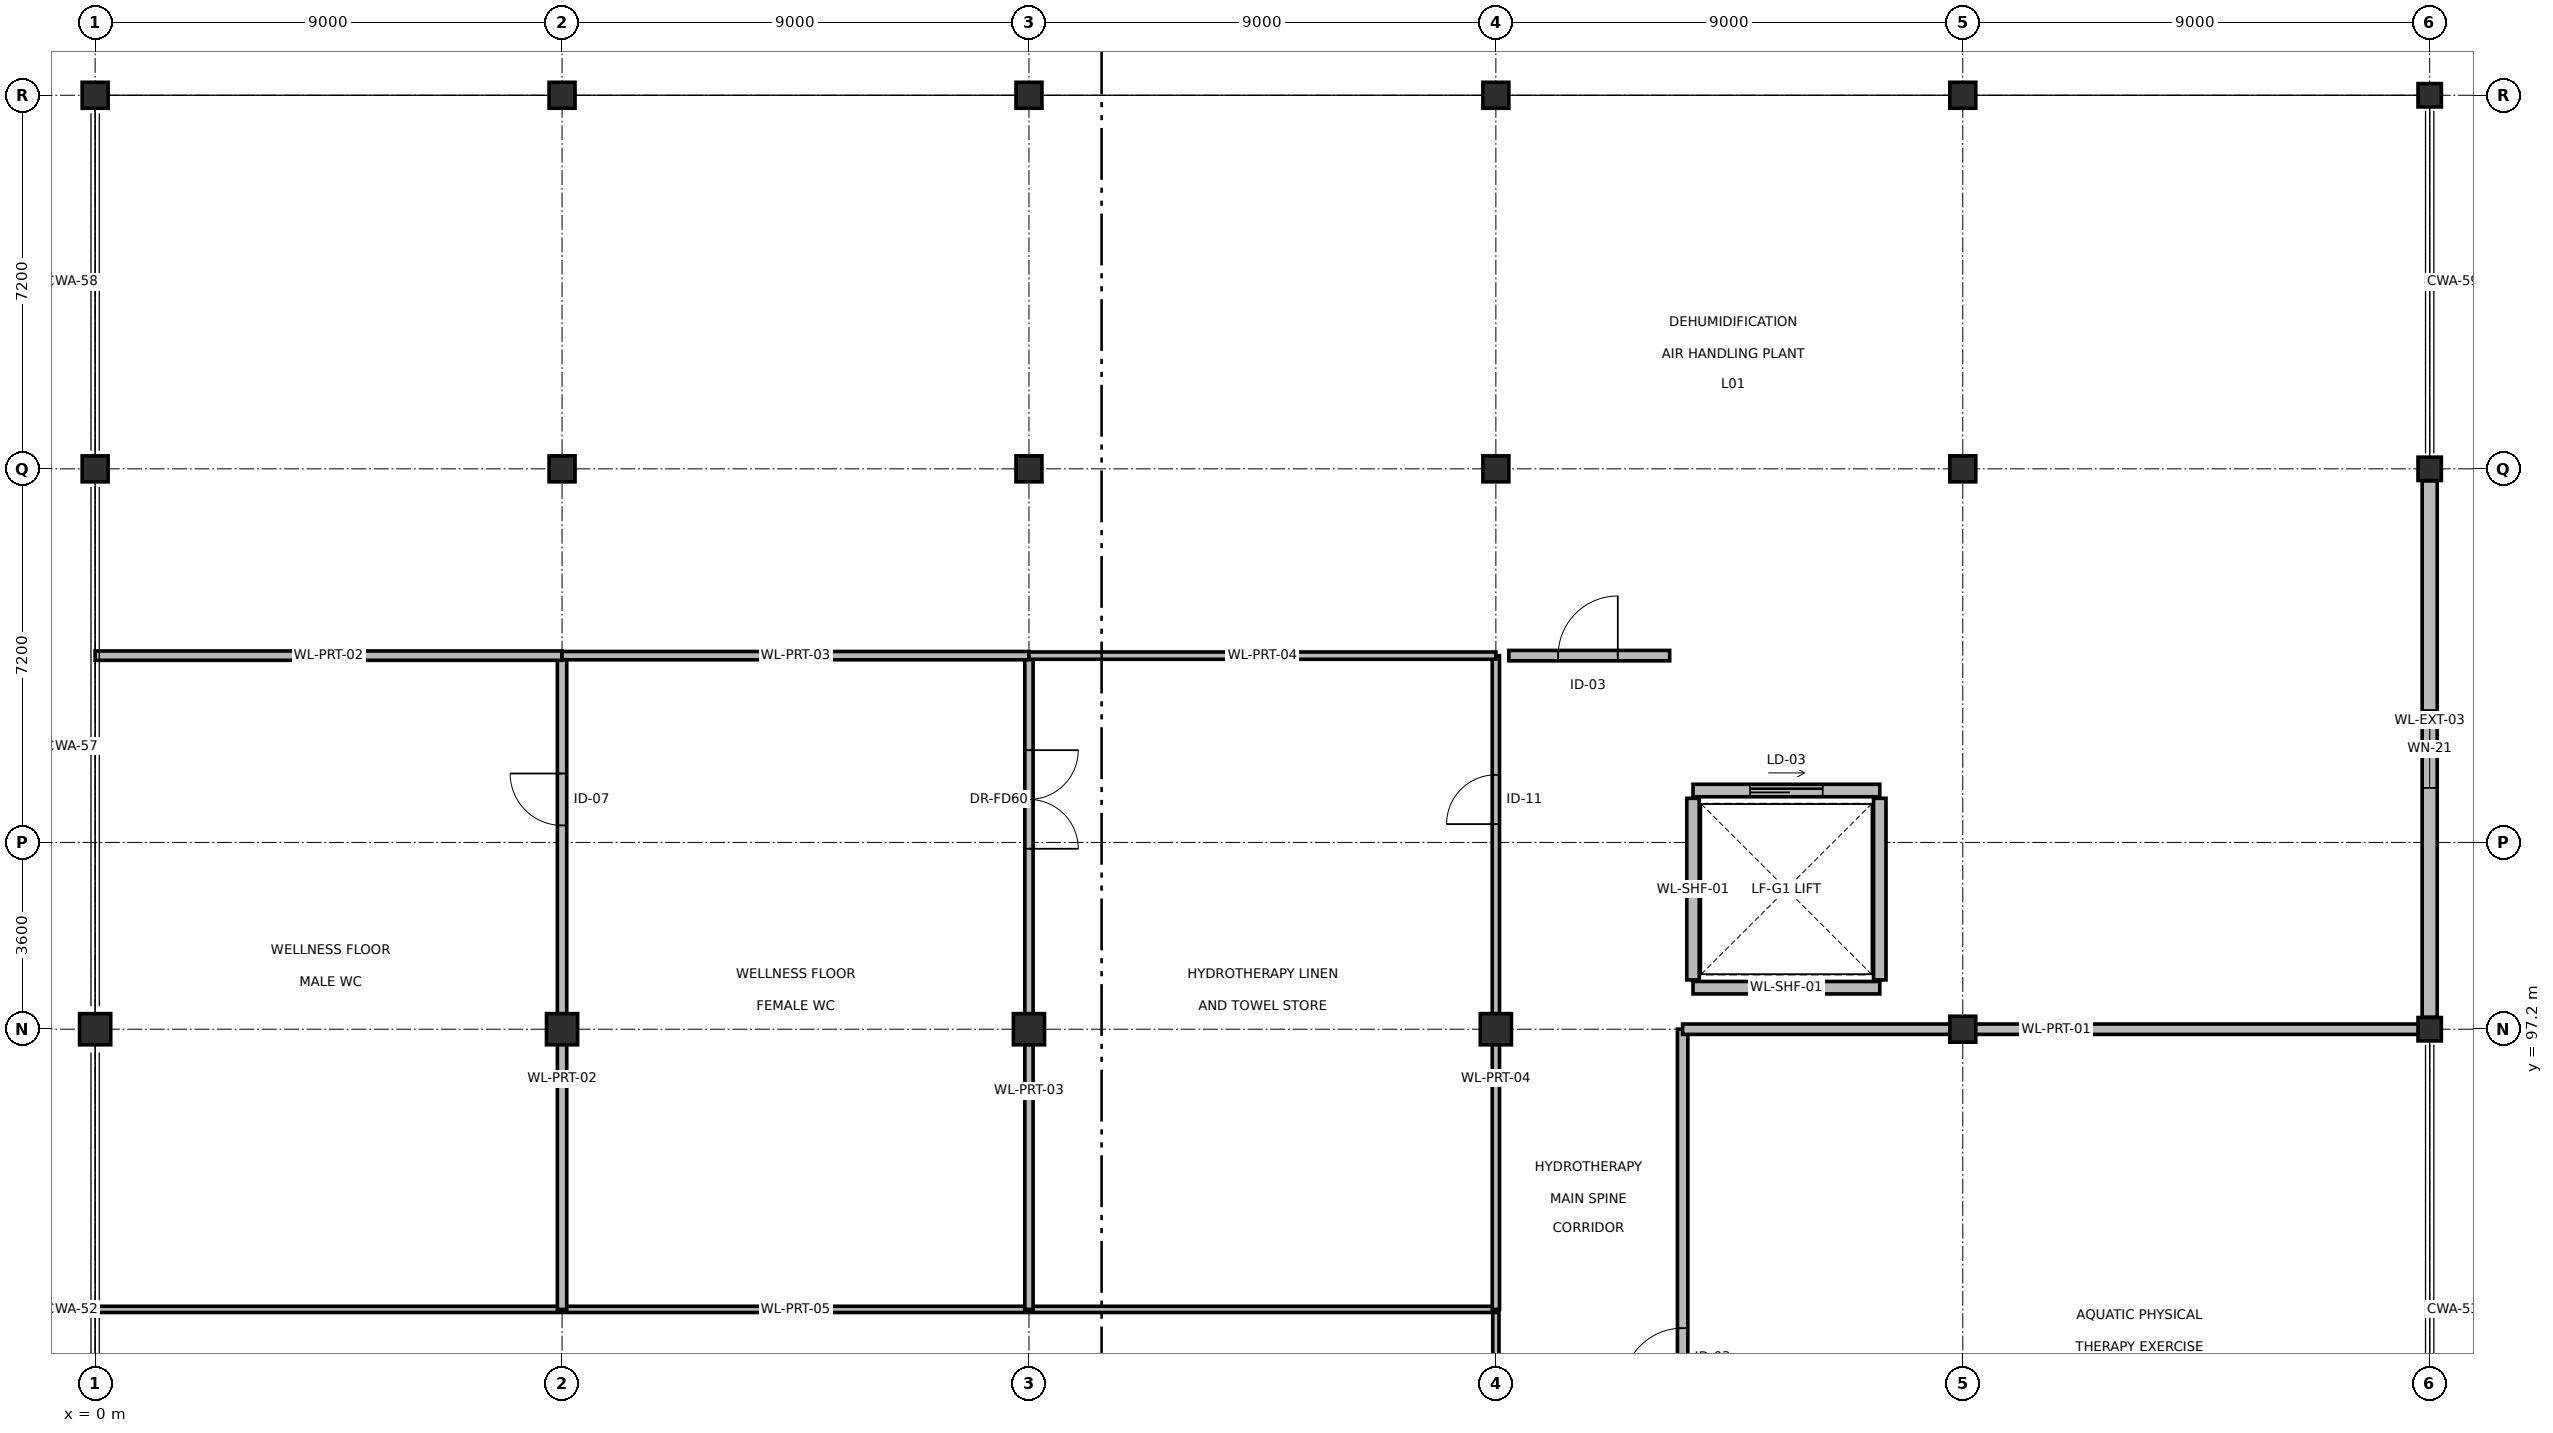
"""IFC4 building model, lengths in metres.
Left out: names, types, materials, properties, quantities, classifications, styles, units other than length and angle.
Written with IfcOpenShell. Run it as: python <this file> out.ifc"""

import sys

from ifc_helpers import new_model, si_unit, direction, frame, frame_2d, origin, origin_2d, place, context, subcontext, project, spatial, rectangle, extrude, element, fill, save


model = new_model("IFC4")
c1 = context("Model", 3, precision=1e-05, world=origin(), true_north=direction((0.0, 1.0)))
c2 = subcontext(c1, "Body", "Model", "MODEL_VIEW")
j1 = project(units=[si_unit("LENGTHUNIT", "METRE"), si_unit("PLANEANGLEUNIT", "RADIAN")], contexts=[c1])
p1 = place(None, origin())
s1 = spatial("IfcSite", under=j1, at=p1, CompositionType="ELEMENT")
p2 = place(p1, origin())
s2 = spatial("IfcBuilding", under=s1, at=p2, CompositionType="ELEMENT")
p3 = place(p2, frame((0.0, 0.0, 4.8)))
s3 = spatial("IfcBuildingStorey", under=s2, at=p3, CompositionType="ELEMENT", Elevation=4.8)
for number, where, z_axis, x_axis in (
    (1, (0.0, 97.2, 0.0), (0.0, 0.0, 1.0), (1.0, 0.0, 0.0)),
    (2, (9.0, 97.2, 0.0), (0.0, 0.0, 1.0), (1.0, 0.0, 0.0)),
    (3, (18.0, 97.2, 0.0), (0.0, 0.0, 1.0), (1.0, 0.0, 0.0)),
    (4, (27.0, 97.2, 0.0), (0.0, 0.0, 1.0), (1.0, 0.0, 0.0)),
):
    element("IfcColumn", number, at=place(p3, frame(where, z_axis=z_axis, x_axis=x_axis)), inside=s3, PredefinedType="COLUMN", context=c2, shape_type="SweptSolid", body=[
        extrude(rectangle(XDim=0.6, YDim=0.6, at=origin_2d()), origin(), (0.0, 0.0, 1.0), 4.8),
    ])
for number, where, z_axis, x_axis in (
    (5, (0.0, 108.0, 0.0), (0.0, 0.0, 1.0), (1.0, 0.0, 0.0)),
    (6, (0.0, 115.2, 0.0), (0.0, 0.0, 1.0), (1.0, 0.0, 0.0)),
    (7, (9.0, 108.0, 0.0), (0.0, 0.0, 1.0), (1.0, 0.0, 0.0)),
    (8, (9.0, 115.2, 0.0), (0.0, 0.0, 1.0), (1.0, 0.0, 0.0)),
    (9, (18.0, 108.0, 0.0), (0.0, 0.0, 1.0), (1.0, 0.0, 0.0)),
    (10, (18.0, 115.2, 0.0), (0.0, 0.0, 1.0), (1.0, 0.0, 0.0)),
    (11, (27.0, 108.0, 0.0), (0.0, 0.0, 1.0), (1.0, 0.0, 0.0)),
    (12, (27.0, 115.2, 0.0), (0.0, 0.0, 1.0), (1.0, 0.0, 0.0)),
    (13, (36.0, 97.2, 0.0), (0.0, 0.0, 1.0), (1.0, 0.0, 0.0)),
    (14, (36.0, 108.0, 0.0), (0.0, 0.0, 1.0), (1.0, 0.0, 0.0)),
    (15, (36.0, 115.2, 0.0), (0.0, 0.0, 1.0), (1.0, 0.0, 0.0)),
):
    element("IfcColumn", number, at=place(p3, frame(where, z_axis=z_axis, x_axis=x_axis)), inside=s3, PredefinedType="COLUMN", context=c2, shape_type="SweptSolid", body=[
        extrude(rectangle(XDim=0.5, YDim=0.5, at=origin_2d()), origin(), (0.0, 0.0, 1.0), 4.8),
    ])
for number, where, z_axis, x_axis in (
    (16, (45.0, 97.2, 0.0), (0.0, 0.0, 1.0), (1.0, 0.0, 0.0)),
    (17, (45.0, 108.0, 0.0), (0.0, 0.0, 1.0), (1.0, 0.0, 0.0)),
    (18, (45.0, 115.2, 0.0), (0.0, 0.0, 1.0), (1.0, 0.0, 0.0)),
):
    element("IfcColumn", number, at=place(p3, frame(where, z_axis=z_axis, x_axis=x_axis)), inside=s3, PredefinedType="COLUMN", context=c2, shape_type="SweptSolid", body=[
        extrude(rectangle(XDim=0.45, YDim=0.45, at=origin_2d()), origin(), (0.0, 0.0, 1.0), 4.8),
    ])
p4 = place(p3, frame((45.0, 107.77, 0.0), z_axis=(0.0, 0.0, 1.0), x_axis=(0.0, -1.0, 0.0)))
e19 = element("IfcWall", 19, at=p4, inside=s3, PredefinedType="SOLIDWALL", context=c2, shape_type="SweptSolid", body=[
    extrude(rectangle(XDim=10.34, YDim=0.29, at=frame_2d((5.17, 0.0))), origin(), (0.0, 0.0, 1.0), 3.825),
])
p5 = place(p4, frame((4.42, 0.0, 0.85)))
e20 = element("IfcOpeningElement", 20, at=p5, cuts=e19, PredefinedType="OPENING", context=c2, shape_type="SweptSolid", body=[
    extrude(rectangle(XDim=1.5, YDim=1.8, at=frame_2d((0.75, 0.9))), frame((0.0, 0.155, 0.0), z_axis=(0.0, -1.0, 0.0), x_axis=(1.0, 0.0, 0.0)), (0.0, 0.0, 1.0), 0.31),
])
p6 = place(p3, frame((30.8, 101.8, 0.0), z_axis=(0.0, 0.0, 1.0), x_axis=(1.0, 0.0, 0.0)))
e21 = element("IfcWall", 21, at=p6, inside=s3, PredefinedType="SOLIDWALL", context=c2, shape_type="SweptSolid", body=[
    extrude(rectangle(XDim=3.6, YDim=0.24, at=frame_2d((1.8, 0.0))), origin(), (0.0, 0.0, 1.0), 4.485),
])
p7 = place(p6, frame((1.1, 0.0, 0.0)))
e22 = element("IfcOpeningElement", 22, at=p7, cuts=e21, PredefinedType="OPENING", context=c2, shape_type="SweptSolid", body=[
    extrude(rectangle(XDim=1.4, YDim=2.3, at=frame_2d((0.7, 1.15))), frame((0.0, 0.13, 0.0), z_axis=(0.0, -1.0, 0.0), x_axis=(1.0, 0.0, 0.0)), (0.0, 0.0, 1.0), 0.26),
])
p8 = place(p3, frame((30.8, 98.0, 0.0), z_axis=(0.0, 0.0, 1.0), x_axis=(1.0, 0.0, 0.0)))
e23 = element("IfcWall", 23, at=p8, inside=s3, PredefinedType="SOLIDWALL", context=c2, shape_type="SweptSolid", body=[
    extrude(rectangle(XDim=3.6, YDim=0.24, at=frame_2d((1.8, 0.0))), origin(), (0.0, 0.0, 1.0), 4.485),
])
for number, where, z_axis, x_axis in (
    (24, (30.8, 98.15, 0.0), (0.0, 0.0, 1.0), (0.0, 1.0, 0.0)),
    (25, (34.4, 98.15, 0.0), (0.0, 0.0, 1.0), (0.0, 1.0, 0.0)),
):
    element("IfcWall", number, at=place(p3, frame(where, z_axis=z_axis, x_axis=x_axis)), inside=s3, PredefinedType="SOLIDWALL", context=c2, shape_type="SweptSolid", body=[
        extrude(rectangle(XDim=3.5, YDim=0.24, at=frame_2d((1.75, 0.0))), origin(), (0.0, 0.0, 1.0), 4.485),
    ])
p9 = place(p3, frame((27.25, 104.4, 0.0), z_axis=(0.0, 0.0, 1.0), x_axis=(1.0, 0.0, 0.0)))
e26 = element("IfcWall", 26, at=p9, inside=s3, PredefinedType="PARTITIONING", context=c2, shape_type="SweptSolid", body=[
    extrude(rectangle(XDim=3.1, YDim=0.2, at=frame_2d((1.55, 0.0))), origin(), (0.0, 0.0, 1.0), 3.775),
])
p10 = place(p9, frame((0.95, 0.0, 0.0)))
e27 = element("IfcOpeningElement", 27, at=p10, cuts=e26, PredefinedType="OPENING", context=c2, shape_type="SweptSolid", body=[
    extrude(rectangle(XDim=1.15, YDim=2.2, at=frame_2d((0.575, 1.1))), frame((0.0, 0.11, 0.0), z_axis=(0.0, -1.0, 0.0), x_axis=(1.0, 0.0, 0.0)), (0.0, 0.0, 1.0), 0.22),
])
p11 = place(p3, frame((27.0, 68.4, 0.0), z_axis=(0.0, 0.0, 1.0), x_axis=(0.0, 1.0, 0.0)))
e28 = element("IfcWall", 28, at=p11, inside=s3, PredefinedType="PARTITIONING", context=c2, shape_type="SweptSolid", body=[
    extrude(rectangle(XDim=23.4, YDim=0.12, at=frame_2d((11.7, 0.0))), origin(), (0.0, 0.0, 1.0), 3.775),
])
p12 = place(p11, frame((4.698, 0.0, 0.0)))
e29 = element("IfcOpeningElement", 29, at=p12, cuts=e28, PredefinedType="OPENING", context=c2, shape_type="SweptSolid", body=[
    extrude(rectangle(XDim=0.9, YDim=2.1, at=frame_2d((0.45, 1.05))), frame((0.0, 0.07, 0.0), z_axis=(0.0, -1.0, 0.0), x_axis=(1.0, 0.0, 0.0)), (0.0, 0.0, 1.0), 0.14),
])
p13 = place(p3, frame((0.0, 91.8, 0.0), z_axis=(0.0, 0.0, 1.0), x_axis=(1.0, 0.0, 0.0)))
e30 = element("IfcWall", 30, at=p13, inside=s3, PredefinedType="PARTITIONING", context=c2, shape_type="SweptSolid", body=[
    extrude(rectangle(XDim=27.0, YDim=0.12, at=frame_2d((13.5, 0.0))), origin(), (0.0, 0.0, 1.0), 3.775),
])
p14 = place(p3, frame((30.6, 68.4, 0.0), z_axis=(0.0, 0.0, 1.0), x_axis=(0.0, 1.0, 0.0)))
e31 = element("IfcWall", 31, at=p14, inside=s3, PredefinedType="PARTITIONING", context=c2, shape_type="SweptSolid", body=[
    extrude(rectangle(XDim=28.8, YDim=0.2, at=frame_2d((14.4, 0.0))), origin(), (0.0, 0.0, 1.0), 3.875),
])
p15 = place(p14, frame((21.889, 0.0, 0.0)))
e32 = element("IfcOpeningElement", 32, at=p15, cuts=e31, PredefinedType="OPENING", context=c2, shape_type="SweptSolid", body=[
    extrude(rectangle(XDim=1.15, YDim=2.2, at=frame_2d((0.575, 1.1))), frame((0.0, 0.11, 0.0), z_axis=(0.0, -1.0, 0.0), x_axis=(1.0, 0.0, 0.0)), (0.0, 0.0, 1.0), 0.22),
])
p16 = place(p3, frame((30.6, 97.2, 0.0), z_axis=(0.0, 0.0, 1.0), x_axis=(1.0, 0.0, 0.0)))
e33 = element("IfcWall", 33, at=p16, inside=s3, PredefinedType="PARTITIONING", context=c2, shape_type="SweptSolid", body=[
    extrude(rectangle(XDim=14.4, YDim=0.2, at=frame_2d((7.2, 0.0))), origin(), (0.0, 0.0, 1.0), 3.775),
])
p17 = place(p3, frame((9.0, 91.8, 0.0), z_axis=(0.0, 0.0, 1.0), x_axis=(0.0, 1.0, 0.0)))
e34 = element("IfcWall", 34, at=p17, inside=s3, PredefinedType="PARTITIONING", context=c2, shape_type="SweptSolid", body=[
    extrude(rectangle(XDim=12.6, YDim=0.18, at=frame_2d((6.3, 0.0))), origin(), (0.0, 0.0, 1.0), 3.775),
])
p18 = place(p17, frame((9.328, 0.0, 0.0)))
e35 = element("IfcOpeningElement", 35, at=p18, cuts=e34, PredefinedType="OPENING", context=c2, shape_type="SweptSolid", body=[
    extrude(rectangle(XDim=1.0, YDim=2.1, at=frame_2d((0.5, 1.05))), frame((0.0, 0.1, 0.0), z_axis=(0.0, -1.0, 0.0), x_axis=(1.0, 0.0, 0.0)), (0.0, 0.0, 1.0), 0.2),
])
p19 = place(p3, frame((0.0, 104.4, 0.0), z_axis=(0.0, 0.0, 1.0), x_axis=(1.0, 0.0, 0.0)))
e36 = element("IfcWall", 36, at=p19, inside=s3, PredefinedType="PARTITIONING", context=c2, shape_type="SweptSolid", body=[
    extrude(rectangle(XDim=9.0, YDim=0.18, at=frame_2d((4.5, 0.0))), origin(), (0.0, 0.0, 1.0), 3.775),
])
p20 = place(p3, frame((18.0, 91.8, 0.0), z_axis=(0.0, 0.0, 1.0), x_axis=(0.0, 1.0, 0.0)))
e37 = element("IfcWall", 37, at=p20, inside=s3, PredefinedType="PARTITIONING", context=c2, shape_type="SweptSolid", body=[
    extrude(rectangle(XDim=12.6, YDim=0.16, at=frame_2d((6.3, 0.0))), origin(), (0.0, 0.0, 1.0), 3.775),
])
p21 = place(p20, frame((8.878, 0.0, 0.0)))
e38 = element("IfcOpeningElement", 38, at=p21, cuts=e37, PredefinedType="OPENING", context=c2, shape_type="SweptSolid", body=[
    extrude(rectangle(XDim=1.9, YDim=2.2, at=frame_2d((0.95, 1.1))), frame((0.0, 0.09, 0.0), z_axis=(0.0, -1.0, 0.0), x_axis=(1.0, 0.0, 0.0)), (0.0, 0.0, 1.0), 0.18),
])
p22 = place(p3, frame((9.0, 104.4, 0.0), z_axis=(0.0, 0.0, 1.0), x_axis=(1.0, 0.0, 0.0)))
e39 = element("IfcWall", 39, at=p22, inside=s3, PredefinedType="PARTITIONING", context=c2, shape_type="SweptSolid", body=[
    extrude(rectangle(XDim=9.0, YDim=0.16, at=frame_2d((4.5, 0.0))), origin(), (0.0, 0.0, 1.0), 3.775),
])
p23 = place(p3, frame((27.0, 91.8, 0.0), z_axis=(0.0, 0.0, 1.0), x_axis=(0.0, 1.0, 0.0)))
e40 = element("IfcWall", 40, at=p23, inside=s3, PredefinedType="PARTITIONING", context=c2, shape_type="SweptSolid", body=[
    extrude(rectangle(XDim=12.6, YDim=0.14, at=frame_2d((6.3, 0.0))), origin(), (0.0, 0.0, 1.0), 3.775),
])
p24 = place(p23, frame((9.353, 0.0, 0.0)))
e41 = element("IfcOpeningElement", 41, at=p24, cuts=e40, PredefinedType="OPENING", context=c2, shape_type="SweptSolid", body=[
    extrude(rectangle(XDim=0.95, YDim=2.1, at=frame_2d((0.475, 1.05))), frame((0.0, 0.08, 0.0), z_axis=(0.0, -1.0, 0.0), x_axis=(1.0, 0.0, 0.0)), (0.0, 0.0, 1.0), 0.16),
])
p25 = place(p3, frame((18.0, 104.4, 0.0), z_axis=(0.0, 0.0, 1.0), x_axis=(1.0, 0.0, 0.0)))
e42 = element("IfcWall", 42, at=p25, inside=s3, PredefinedType="PARTITIONING", context=c2, shape_type="SweptSolid", body=[
    extrude(rectangle(XDim=9.0, YDim=0.14, at=frame_2d((4.5, 0.0))), origin(), (0.0, 0.0, 1.0), 3.775),
])
p26 = place(p5, origin())
e43 = element("IfcWindow", 43, at=p26, inside=s3, PartitioningType="SINGLE_PANEL", PredefinedType="WINDOW", context=c2, shape_type="SweptSolid", body=[
    extrude(rectangle(XDim=1.5, YDim=1.8, at=frame_2d((0.75, 0.9))), frame((0.0, 0.03, 0.0), z_axis=(0.0, -1.0, 0.0), x_axis=(1.0, 0.0, 0.0)), (0.0, 0.0, 1.0), 0.06),
])
fill(e20, e43)
p27 = place(p7, origin())
e44 = element("IfcDoor", 44, at=p27, inside=s3, OperationType="DOUBLE_DOOR_SLIDING", PredefinedType="DOOR", context=c2, shape_type="SweptSolid", body=[
    extrude(rectangle(XDim=1.4, YDim=2.3, at=frame_2d((0.7, 1.15))), frame((0.0, 0.025, 0.0), z_axis=(0.0, -1.0, 0.0), x_axis=(1.0, 0.0, 0.0)), (0.0, 0.0, 1.0), 0.05),
])
fill(e22, e44)
p28 = place(p10, origin())
e45 = element("IfcDoor", 45, at=p28, inside=s3, OperationType="SINGLE_SWING_RIGHT", PredefinedType="DOOR", context=c2, shape_type="SweptSolid", body=[
    extrude(rectangle(XDim=1.15, YDim=2.2, at=frame_2d((0.575, 1.1))), frame((0.0, 0.025, 0.0), z_axis=(0.0, -1.0, 0.0), x_axis=(1.0, 0.0, 0.0)), (0.0, 0.0, 1.0), 0.05),
])
fill(e27, e45)
p29 = place(p15, origin())
e46 = element("IfcDoor", 46, at=p29, inside=s3, OperationType="SINGLE_SWING_LEFT", PredefinedType="DOOR", context=c2, shape_type="SweptSolid", body=[
    extrude(rectangle(XDim=1.15, YDim=2.2, at=frame_2d((0.575, 1.1))), frame((0.0, 0.025, 0.0), z_axis=(0.0, -1.0, 0.0), x_axis=(1.0, 0.0, 0.0)), (0.0, 0.0, 1.0), 0.05),
])
fill(e32, e46)
p30 = place(p18, origin())
e47 = element("IfcDoor", 47, at=p30, inside=s3, OperationType="SINGLE_SWING_RIGHT", PredefinedType="DOOR", context=c2, shape_type="SweptSolid", body=[
    extrude(rectangle(XDim=1.0, YDim=2.1, at=frame_2d((0.5, 1.05))), frame((0.0, 0.025, 0.0), z_axis=(0.0, -1.0, 0.0), x_axis=(1.0, 0.0, 0.0)), (0.0, 0.0, 1.0), 0.05),
])
fill(e35, e47)
p31 = place(p21, origin())
e48 = element("IfcDoor", 48, at=p31, inside=s3, OperationType="DOUBLE_DOOR_SINGLE_SWING", PredefinedType="DOOR", context=c2, shape_type="SweptSolid", body=[
    extrude(rectangle(XDim=1.9, YDim=2.2, at=frame_2d((0.95, 1.1))), frame((0.0, 0.025, 0.0), z_axis=(0.0, -1.0, 0.0), x_axis=(1.0, 0.0, 0.0)), (0.0, 0.0, 1.0), 0.05),
])
fill(e38, e48)
p32 = place(p24, origin())
e49 = element("IfcDoor", 49, at=p32, inside=s3, OperationType="SINGLE_SWING_LEFT", PredefinedType="DOOR", context=c2, shape_type="SweptSolid", body=[
    extrude(rectangle(XDim=0.95, YDim=2.1, at=frame_2d((0.475, 1.05))), frame((0.0, 0.025, 0.0), z_axis=(0.0, -1.0, 0.0), x_axis=(1.0, 0.0, 0.0)), (0.0, 0.0, 1.0), 0.05),
])
fill(e41, e49)
save(model, sys.argv[1])
